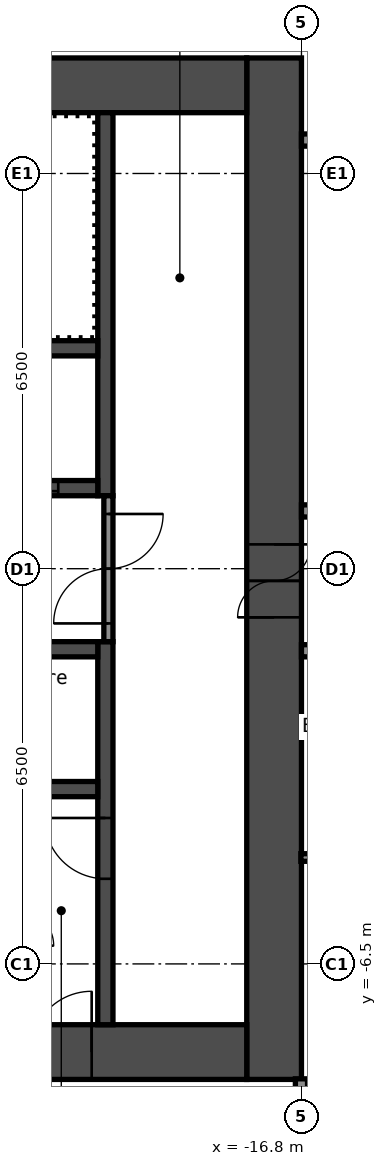
"""IFC4 building model, lengths in metres.
Left out: names, types, materials, properties, quantities, classifications, styles, units other than length and angle.
Written with IfcOpenShell. Run it as: python <this file> out.ifc"""

import sys

from ifc_helpers import new_model, si_unit, direction, frame, frame_2d, origin, place, context, subcontext, project, spatial, rectangle, extrude, element, fill, save


model = new_model("IFC4")
c1 = context("Model", 3, precision=1e-05, world=origin(), true_north=direction((0.0, 1.0)))
c2 = subcontext(c1, "Body", "Model", "MODEL_VIEW")
j1 = project(units=[si_unit("LENGTHUNIT", "METRE"), si_unit("PLANEANGLEUNIT", "RADIAN")], contexts=[c1])
p1 = place(None, origin())
s1 = spatial("IfcSite", under=j1, at=p1, CompositionType="ELEMENT")
p2 = place(p1, origin())
s2 = spatial("IfcBuilding", under=s1, at=p2, CompositionType="ELEMENT")
p3 = place(p2, frame((0.0, 0.0, 107.4)))
s3 = spatial("IfcBuildingStorey", under=s2, at=p3, CompositionType="ELEMENT", Elevation=107.4)
p4 = place(p3, frame((-17.25, -8.4, 0.0), z_axis=(0.0, 0.0, 1.0), x_axis=(0.0, 1.0, 0.0)))
e1 = element("IfcWall", 1, at=p4, inside=s3, PredefinedType="SHEAR", context=c2, shape_type="SweptSolid", body=[
    extrude(rectangle(XDim=16.8, YDim=0.9, at=frame_2d((8.4, 0.0))), origin(), (0.0, 0.0, 1.0), 2.8),
])
p5 = place(p4, frame((7.6, 0.0, 0.0)))
e2 = element("IfcOpeningElement", 2, at=p5, cuts=e1, PredefinedType="OPENING", context=c2, shape_type="SweptSolid", body=[
    extrude(rectangle(XDim=1.2, YDim=2.1, at=frame_2d((0.6, 1.05))), frame((0.0, 0.46, 0.0), z_axis=(0.0, -1.0, 0.0), x_axis=(1.0, 0.0, 0.0)), (0.0, 0.0, 1.0), 0.92),
])
p6 = place(p3, frame((-32.7, 7.95, 0.0), z_axis=(0.0, 0.0, 1.0), x_axis=(1.0, 0.0, 0.0)))
e3 = element("IfcWall", 3, at=p6, inside=s3, PredefinedType="SHEAR", context=c2, shape_type="SweptSolid", body=[
    extrude(rectangle(XDim=15.0, YDim=0.9, at=frame_2d((7.5, 0.0))), origin(), (0.0, 0.0, 1.0), 2.8),
])
p7 = place(p6, frame((3.4, 0.0, 0.0)))
e4 = element("IfcOpeningElement", 4, at=p7, cuts=e3, PredefinedType="OPENING", context=c2, shape_type="SweptSolid", body=[
    extrude(rectangle(XDim=1.2, YDim=2.1, at=frame_2d((0.6, 1.05))), frame((0.0, 0.46, 0.0), z_axis=(0.0, -1.0, 0.0), x_axis=(1.0, 0.0, 0.0)), (0.0, 0.0, 1.0), 0.92),
])
p8 = place(p6, frame((0.75, 0.0, 0.0)))
e5 = element("IfcOpeningElement", 5, at=p8, cuts=e3, PredefinedType="OPENING", context=c2, shape_type="SweptSolid", body=[
    extrude(rectangle(XDim=0.9, YDim=2.1, at=frame_2d((0.45, 1.05))), frame((0.0, 0.46, 0.0), z_axis=(0.0, -1.0, 0.0), x_axis=(1.0, 0.0, 0.0)), (0.0, 0.0, 1.0), 0.92),
])
p9 = place(p3, frame((-32.7, -7.95, 0.0), z_axis=(0.0, 0.0, 1.0), x_axis=(1.0, 0.0, 0.0)))
e6 = element("IfcWall", 6, at=p9, inside=s3, PredefinedType="SHEAR", context=c2, shape_type="SweptSolid", body=[
    extrude(rectangle(XDim=15.0, YDim=0.9, at=frame_2d((7.5, 0.0))), origin(), (0.0, 0.0, 1.0), 2.8),
])
p10 = place(p9, frame((11.45, 0.0, 0.0)))
e7 = element("IfcOpeningElement", 7, at=p10, cuts=e6, PredefinedType="OPENING", context=c2, shape_type="SweptSolid", body=[
    extrude(rectangle(XDim=1.0, YDim=2.1, at=frame_2d((0.5, 1.05))), frame((0.0, 0.46, 0.0), z_axis=(0.0, -1.0, 0.0), x_axis=(1.0, 0.0, 0.0)), (0.0, 0.0, 1.0), 0.92),
])
p11 = place(p3, frame((-20.025, 1.2, 0.0), z_axis=(0.0, 0.0, 1.0), x_axis=(0.0, 1.0, 0.0)))
e8 = element("IfcWall", 8, at=p11, inside=s3, PredefinedType="SHEAR", context=c2, shape_type="SweptSolid", body=[
    extrude(rectangle(XDim=6.3, YDim=0.25, at=frame_2d((3.15, 0.0))), origin(), (0.0, 0.0, 1.0), 2.8),
])
p12 = place(p3, frame((-20.025, -7.5, 0.0), z_axis=(0.0, 0.0, 1.0), x_axis=(0.0, 1.0, 0.0)))
e9 = element("IfcWall", 9, at=p12, inside=s3, PredefinedType="SHEAR", context=c2, shape_type="SweptSolid", body=[
    extrude(rectangle(XDim=6.3, YDim=0.25, at=frame_2d((3.15, 0.0))), origin(), (0.0, 0.0, 1.0), 2.8),
])
p13 = place(p12, frame((2.4, 0.0, 0.0)))
e10 = element("IfcOpeningElement", 10, at=p13, cuts=e9, PredefinedType="OPENING", context=c2, shape_type="SweptSolid", body=[
    extrude(rectangle(XDim=1.0, YDim=2.1, at=frame_2d((0.5, 1.05))), frame((0.0, 0.135, 0.0), z_axis=(0.0, -1.0, 0.0), x_axis=(1.0, 0.0, 0.0)), (0.0, 0.0, 1.0), 0.27),
])
p14 = place(p3, frame((-27.65, 1.325, 0.0), z_axis=(0.0, 0.0, 1.0), x_axis=(1.0, 0.0, 0.0)))
e11 = element("IfcWall", 11, at=p14, inside=s3, PredefinedType="SHEAR", context=c2, shape_type="SweptSolid", body=[
    extrude(rectangle(XDim=7.5, YDim=0.25, at=frame_2d((3.75, 0.0))), origin(), (0.0, 0.0, 1.0), 2.8),
])
p15 = place(p14, frame((5.75, 0.0, 0.0)))
e12 = element("IfcOpeningElement", 12, at=p15, cuts=e11, PredefinedType="OPENING", context=c2, shape_type="SweptSolid", body=[
    extrude(rectangle(XDim=1.1, YDim=2.1, at=frame_2d((0.55, 1.05))), frame((0.0, 0.135, 0.0), z_axis=(0.0, -1.0, 0.0), x_axis=(1.0, 0.0, 0.0)), (0.0, 0.0, 1.0), 0.27),
])
p16 = place(p14, frame((3.35, 0.0, 0.0)))
e13 = element("IfcOpeningElement", 13, at=p16, cuts=e11, PredefinedType="OPENING", context=c2, shape_type="SweptSolid", body=[
    extrude(rectangle(XDim=1.1, YDim=2.1, at=frame_2d((0.55, 1.05))), frame((0.0, 0.135, 0.0), z_axis=(0.0, -1.0, 0.0), x_axis=(1.0, 0.0, 0.0)), (0.0, 0.0, 1.0), 0.27),
])
p17 = place(p14, frame((0.95, 0.0, 0.0)))
e14 = element("IfcOpeningElement", 14, at=p17, cuts=e11, PredefinedType="OPENING", context=c2, shape_type="SweptSolid", body=[
    extrude(rectangle(XDim=1.1, YDim=2.1, at=frame_2d((0.55, 1.05))), frame((0.0, 0.135, 0.0), z_axis=(0.0, -1.0, 0.0), x_axis=(1.0, 0.0, 0.0)), (0.0, 0.0, 1.0), 0.27),
])
for number, where, z_axis, x_axis in (
    (15, (-27.65, 3.625, 0.0), (0.0, 0.0, 1.0), (1.0, 0.0, 0.0)),
    (16, (-27.65, -1.325, 0.0), (0.0, 0.0, 1.0), (1.0, 0.0, 0.0)),
    (17, (-27.65, -3.625, 0.0), (0.0, 0.0, 1.0), (1.0, 0.0, 0.0)),
):
    element("IfcWall", number, at=place(p3, frame(where, z_axis=z_axis, x_axis=x_axis)), inside=s3, PredefinedType="SHEAR", context=c2, shape_type="SweptSolid", body=[
        extrude(rectangle(XDim=7.5, YDim=0.25, at=frame_2d((3.75, 0.0))), origin(), (0.0, 0.0, 1.0), 2.8),
    ])
p18 = place(p3, frame((-19.975, -1.2, 0.0), z_axis=(0.0, 0.0, 1.0), x_axis=(0.0, 1.0, 0.0)))
e18 = element("IfcWall", 18, at=p18, inside=s3, PredefinedType="PARTITIONING", context=c2, shape_type="SweptSolid", body=[
    extrude(rectangle(XDim=2.4, YDim=0.15, at=frame_2d((1.2, 0.0))), origin(), (0.0, 0.0, 1.0), 2.8),
])
p19 = place(p18, frame((0.3, 0.0, 0.0)))
e19 = element("IfcOpeningElement", 19, at=p19, cuts=e18, PredefinedType="OPENING", context=c2, shape_type="SweptSolid", body=[
    extrude(rectangle(XDim=1.8, YDim=2.1, at=frame_2d((0.9, 1.05))), frame((0.0, 0.085, 0.0), z_axis=(0.0, -1.0, 0.0), x_axis=(1.0, 0.0, 0.0)), (0.0, 0.0, 1.0), 0.17),
])
p20 = place(p3, frame((-16.81, -4.75, 0.0), z_axis=(0.0, 0.0, 1.0), x_axis=(1.0, 0.0, 0.0)))
e20 = element("IfcWall", 20, at=p20, inside=s3, PredefinedType="PARTITIONING", context=c2, shape_type="SweptSolid", body=[
    extrude(rectangle(XDim=3.348, YDim=0.125, at=frame_2d((1.674, 0.0))), origin(), (0.0, 0.0, 1.0), 2.8),
])
p21 = place(p20, frame((1.31, 0.0, 0.0)))
e21 = element("IfcOpeningElement", 21, at=p21, cuts=e20, PredefinedType="OPENING", context=c2, shape_type="SweptSolid", body=[
    extrude(rectangle(XDim=0.8, YDim=2.1, at=frame_2d((0.4, 1.05))), frame((0.0, 0.073, 0.0), z_axis=(0.0, -1.0, 0.0), x_axis=(1.0, 0.0, 0.0)), (0.0, 0.0, 1.0), 0.145),
])
p22 = place(p3, frame((-16.8, -1.35, 0.0), z_axis=(0.0, 0.0, 1.0), x_axis=(1.0, 0.0, 0.0)))
e22 = element("IfcWall", 22, at=p22, inside=s3, PredefinedType="PARTITIONING", context=c2, shape_type="SweptSolid", body=[
    extrude(rectangle(XDim=33.6, YDim=0.2, at=frame_2d((16.8, 0.0))), origin(), (0.0, 0.0, 1.0), 2.8),
])
p23 = place(p22, frame((5.4, 0.0, 0.0)))
e23 = element("IfcOpeningElement", 23, at=p23, cuts=e22, PredefinedType="OPENING", context=c2, shape_type="SweptSolid", body=[
    extrude(rectangle(XDim=1.0, YDim=2.1, at=frame_2d((0.5, 1.05))), frame((0.0, 0.11, 0.0), z_axis=(0.0, -1.0, 0.0), x_axis=(1.0, 0.0, 0.0)), (0.0, 0.0, 1.0), 0.22),
])
p24 = place(p22, frame((9.46, 0.0, 0.0)))
e24 = element("IfcOpeningElement", 24, at=p24, cuts=e22, PredefinedType="OPENING", context=c2, shape_type="SweptSolid", body=[
    extrude(rectangle(XDim=0.9, YDim=2.1, at=frame_2d((0.45, 1.05))), frame((0.0, 0.11, 0.0), z_axis=(0.0, -1.0, 0.0), x_axis=(1.0, 0.0, 0.0)), (0.0, 0.0, 1.0), 0.22),
])
p25 = place(p22, frame((13.66, 0.0, 0.0)))
e25 = element("IfcOpeningElement", 25, at=p25, cuts=e22, PredefinedType="OPENING", context=c2, shape_type="SweptSolid", body=[
    extrude(rectangle(XDim=0.9, YDim=2.1, at=frame_2d((0.45, 1.05))), frame((0.0, 0.11, 0.0), z_axis=(0.0, -1.0, 0.0), x_axis=(1.0, 0.0, 0.0)), (0.0, 0.0, 1.0), 0.22),
])
p26 = place(p22, frame((18.8, 0.0, 0.0)))
e26 = element("IfcOpeningElement", 26, at=p26, cuts=e22, PredefinedType="OPENING", context=c2, shape_type="SweptSolid", body=[
    extrude(rectangle(XDim=1.0, YDim=2.1, at=frame_2d((0.5, 1.05))), frame((0.0, 0.11, 0.0), z_axis=(0.0, -1.0, 0.0), x_axis=(1.0, 0.0, 0.0)), (0.0, 0.0, 1.0), 0.22),
])
p27 = place(p22, frame((30.6, 0.0, 0.0)))
e27 = element("IfcOpeningElement", 27, at=p27, cuts=e22, PredefinedType="OPENING", context=c2, shape_type="SweptSolid", body=[
    extrude(rectangle(XDim=1.0, YDim=2.1, at=frame_2d((0.5, 1.05))), frame((0.0, 0.11, 0.0), z_axis=(0.0, -1.0, 0.0), x_axis=(1.0, 0.0, 0.0)), (0.0, 0.0, 1.0), 0.22),
])
p28 = place(p3, frame((-16.8, 0.95, 0.0), z_axis=(0.0, 0.0, 1.0), x_axis=(1.0, 0.0, 0.0)))
e28 = element("IfcWall", 28, at=p28, inside=s3, PredefinedType="PARTITIONING", context=c2, shape_type="SweptSolid", body=[
    extrude(rectangle(XDim=33.6, YDim=0.2, at=frame_2d((16.8, 0.0))), origin(), (0.0, 0.0, 1.0), 2.8),
])
p29 = place(p28, frame((9.715, 0.0, 0.0)))
e29 = element("IfcOpeningElement", 29, at=p29, cuts=e28, PredefinedType="OPENING", context=c2, shape_type="SweptSolid", body=[
    extrude(rectangle(XDim=0.9, YDim=2.1, at=frame_2d((0.45, 1.05))), frame((0.0, 0.11, 0.0), z_axis=(0.0, -1.0, 0.0), x_axis=(1.0, 0.0, 0.0)), (0.0, 0.0, 1.0), 0.22),
])
p30 = place(p28, frame((13.915, 0.0, 0.0)))
e30 = element("IfcOpeningElement", 30, at=p30, cuts=e28, PredefinedType="OPENING", context=c2, shape_type="SweptSolid", body=[
    extrude(rectangle(XDim=0.9, YDim=2.1, at=frame_2d((0.45, 1.05))), frame((0.0, 0.11, 0.0), z_axis=(0.0, -1.0, 0.0), x_axis=(1.0, 0.0, 0.0)), (0.0, 0.0, 1.0), 0.22),
])
p31 = place(p28, frame((26.68, 0.0, 0.0)))
e31 = element("IfcOpeningElement", 31, at=p31, cuts=e28, PredefinedType="OPENING", context=c2, shape_type="SweptSolid", body=[
    extrude(rectangle(XDim=0.9, YDim=2.1, at=frame_2d((0.45, 1.05))), frame((0.0, 0.11, 0.0), z_axis=(0.0, -1.0, 0.0), x_axis=(1.0, 0.0, 0.0)), (0.0, 0.0, 1.0), 0.22),
])
p32 = place(p28, frame((30.88, 0.0, 0.0)))
e32 = element("IfcOpeningElement", 32, at=p32, cuts=e28, PredefinedType="OPENING", context=c2, shape_type="SweptSolid", body=[
    extrude(rectangle(XDim=0.9, YDim=2.1, at=frame_2d((0.45, 1.05))), frame((0.0, 0.11, 0.0), z_axis=(0.0, -1.0, 0.0), x_axis=(1.0, 0.0, 0.0)), (0.0, 0.0, 1.0), 0.22),
])
p33 = place(p3, frame((-16.8, 7.05, 0.0), z_axis=(0.0, 0.0, 1.0), x_axis=(1.0, 0.0, 0.0)))
e33 = element("IfcWall", 33, at=p33, inside=s3, PredefinedType="PARTITIONING", context=c2, shape_type="SweptSolid", body=[
    extrude(rectangle(XDim=33.6, YDim=0.2, at=frame_2d((16.8, 0.0))), origin(), (0.0, 0.0, 1.0), 2.8),
])
p34 = place(p33, frame((1.9, 0.0, 0.0)))
e34 = element("IfcOpeningElement", 34, at=p34, cuts=e33, PredefinedType="OPENING", context=c2, shape_type="SweptSolid", body=[
    extrude(rectangle(XDim=0.9, YDim=2.1, at=frame_2d((0.45, 1.05))), frame((0.0, 0.11, 0.0), z_axis=(0.0, -1.0, 0.0), x_axis=(1.0, 0.0, 0.0)), (0.0, 0.0, 1.0), 0.22),
])
p35 = place(p33, frame((6.1, 0.0, 0.0)))
e35 = element("IfcOpeningElement", 35, at=p35, cuts=e33, PredefinedType="OPENING", context=c2, shape_type="SweptSolid", body=[
    extrude(rectangle(XDim=0.9, YDim=2.1, at=frame_2d((0.45, 1.05))), frame((0.0, 0.11, 0.0), z_axis=(0.0, -1.0, 0.0), x_axis=(1.0, 0.0, 0.0)), (0.0, 0.0, 1.0), 0.22),
])
p36 = place(p33, frame((18.87, 0.0, 0.0)))
e36 = element("IfcOpeningElement", 36, at=p36, cuts=e33, PredefinedType="OPENING", context=c2, shape_type="SweptSolid", body=[
    extrude(rectangle(XDim=0.9, YDim=2.1, at=frame_2d((0.45, 1.05))), frame((0.0, 0.11, 0.0), z_axis=(0.0, -1.0, 0.0), x_axis=(1.0, 0.0, 0.0)), (0.0, 0.0, 1.0), 0.22),
])
p37 = place(p33, frame((23.07, 0.0, 0.0)))
e37 = element("IfcOpeningElement", 37, at=p37, cuts=e33, PredefinedType="OPENING", context=c2, shape_type="SweptSolid", body=[
    extrude(rectangle(XDim=0.9, YDim=2.1, at=frame_2d((0.45, 1.05))), frame((0.0, 0.11, 0.0), z_axis=(0.0, -1.0, 0.0), x_axis=(1.0, 0.0, 0.0)), (0.0, 0.0, 1.0), 0.22),
])
p38 = place(p3, frame((-16.8, -15.55, 0.0), z_axis=(0.0, 0.0, 1.0), x_axis=(0.0, 1.0, 0.0)))
e38 = element("IfcWall", 38, at=p38, inside=s3, PredefinedType="PARTITIONING", context=c2, shape_type="SweptSolid", body=[
    extrude(rectangle(XDim=7.16, YDim=0.2, at=frame_2d((3.58, 0.0))), origin(), (0.0, 0.0, 1.0), 2.8),
])
p39 = place(p5, origin())
e39 = element("IfcDoor", 39, at=p39, inside=s3, OperationType="DOUBLE_DOOR_SINGLE_SWING", PredefinedType="DOOR", context=c2, shape_type="SweptSolid", body=[
    extrude(rectangle(XDim=1.2, YDim=2.1, at=frame_2d((0.6, 1.05))), frame((0.0, 0.025, 0.0), z_axis=(0.0, -1.0, 0.0), x_axis=(1.0, 0.0, 0.0)), (0.0, 0.0, 1.0), 0.05),
])
fill(e2, e39)
p40 = place(p10, origin())
e40 = element("IfcDoor", 40, at=p40, inside=s3, OperationType="SINGLE_SWING_LEFT", PredefinedType="DOOR", context=c2, shape_type="SweptSolid", body=[
    extrude(rectangle(XDim=1.0, YDim=2.1, at=frame_2d((0.5, 1.05))), frame((0.0, 0.025, 0.0), z_axis=(0.0, -1.0, 0.0), x_axis=(1.0, 0.0, 0.0)), (0.0, 0.0, 1.0), 0.05),
])
fill(e7, e40)
p41 = place(p13, origin())
e41 = element("IfcDoor", 41, at=p41, inside=s3, OperationType="SINGLE_SWING_LEFT", PredefinedType="DOOR", context=c2, shape_type="SweptSolid", body=[
    extrude(rectangle(XDim=1.0, YDim=2.1, at=frame_2d((0.5, 1.05))), frame((0.0, 0.025, 0.0), z_axis=(0.0, -1.0, 0.0), x_axis=(1.0, 0.0, 0.0)), (0.0, 0.0, 1.0), 0.05),
])
fill(e10, e41)
p42 = place(p19, origin())
e42 = element("IfcDoor", 42, at=p42, inside=s3, OperationType="DOUBLE_DOOR_SINGLE_SWING", PredefinedType="DOOR", context=c2, shape_type="SweptSolid", body=[
    extrude(rectangle(XDim=1.8, YDim=2.1, at=frame_2d((0.9, 1.05))), frame((0.0, 0.025, 0.0), z_axis=(0.0, -1.0, 0.0), x_axis=(1.0, 0.0, 0.0)), (0.0, 0.0, 1.0), 0.05),
])
fill(e19, e42)
p43 = place(p15, origin())
e43 = element("IfcDoor", 43, at=p43, inside=s3, OperationType="DOUBLE_DOOR_SLIDING", PredefinedType="DOOR", context=c2, shape_type="SweptSolid", body=[
    extrude(rectangle(XDim=1.1, YDim=2.1, at=frame_2d((0.55, 1.05))), frame((0.0, 0.025, 0.0), z_axis=(0.0, -1.0, 0.0), x_axis=(1.0, 0.0, 0.0)), (0.0, 0.0, 1.0), 0.05),
])
fill(e12, e43)
save(model, sys.argv[1])
